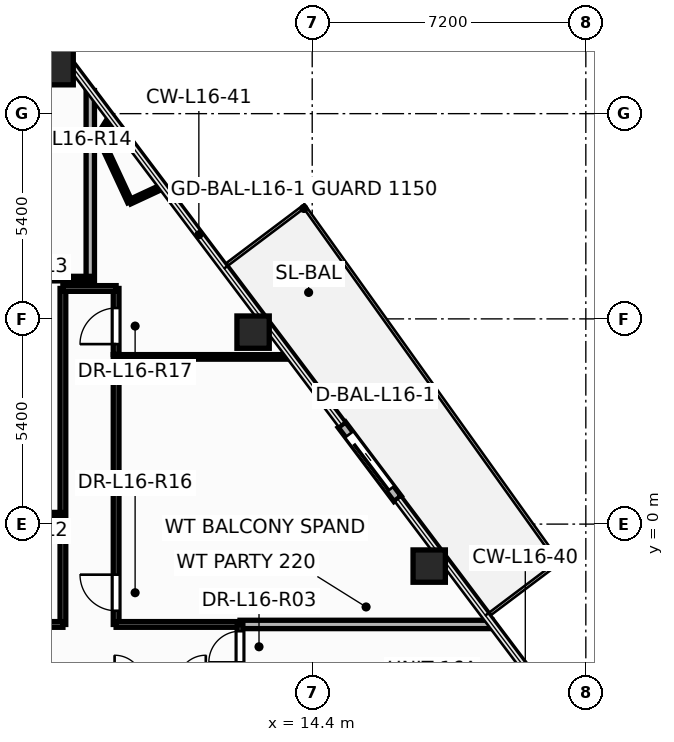
"""IFC4 building model, lengths in metres.
Left out: names, types, materials, properties, quantities, classifications, styles, units other than length and angle.
Written with IfcOpenShell. Run it as: python <this file> out.ifc"""

import sys

from ifc_helpers import new_model, si_unit, direction, frame, frame_2d, origin, origin_2d, place, context, subcontext, project, spatial, rectangle, hollow_rectangle, hollow_circle, extrude, element, fill, save


model = new_model("IFC4")
c1 = context("Model", 3, precision=1e-05, world=origin(), true_north=direction((0.0, 1.0)))
c2 = subcontext(c1, "Body", "Model", "MODEL_VIEW")
j1 = project(units=[si_unit("LENGTHUNIT", "METRE"), si_unit("PLANEANGLEUNIT", "RADIAN")], contexts=[c1])
p1 = place(None, origin())
s1 = spatial("IfcSite", under=j1, at=p1, CompositionType="ELEMENT")
p2 = place(p1, origin())
s2 = spatial("IfcBuilding", under=s1, at=p2, CompositionType="ELEMENT")
p3 = place(p2, frame((0.0, 0.0, 64.8)))
s3 = spatial("IfcBuildingStorey", under=s2, at=p3, CompositionType="ELEMENT", Elevation=64.8)
p4 = place(p3, frame((7.438, 12.233, 0.0), z_axis=(0.0, 0.0, 1.0), x_axis=(1.0, 0.0, 0.0)))
e1 = element("IfcColumn", 1, at=p4, inside=s3, PredefinedType="COLUMN", context=c2, shape_type="SweptSolid", body=[
    extrude(hollow_rectangle(XDim=1.35, YDim=1.35, WallThickness=0.065, at=origin_2d()), origin(), (0.0, 0.0, 1.0), 3.6),
])
for number, where, z_axis, x_axis in (
    (2, (17.479, -1.104, 0.0), (0.0, 0.0, 1.0), (1.0, 0.0, 0.0)),
    (3, (12.844, 5.051, 0.0), (0.0, 0.0, 1.0), (1.0, 0.0, 0.0)),
):
    element("IfcColumn", number, at=place(p3, frame(where, z_axis=z_axis, x_axis=x_axis)), inside=s3, PredefinedType="COLUMN", context=c2, shape_type="SweptSolid", body=[
        extrude(hollow_circle(Radius=0.425, WallThickness=0.038, at=origin_2d()), origin(), (0.0, 0.0, 1.0), 3.6),
    ])
p5 = place(p3, frame((16.646, 0.666, -0.015), z_axis=(0.0, 0.0, 1.0), x_axis=(-0.601471893772, 0.79889396105, 0.0)))
e4 = element("IfcWall", 4, at=p5, inside=s3, PredefinedType="STANDARD", context=c2, shape_type="SweptSolid", body=[
    extrude(rectangle(XDim=2.44, YDim=0.24, at=frame_2d((1.22, 0.0))), origin(), (0.0, 0.0, 1.0), 2.729),
])
p6 = place(p5, frame((0.32, 0.0, 0.015)))
e5 = element("IfcOpeningElement", 5, at=p6, cuts=e4, PredefinedType="OPENING", context=c2, shape_type="SweptSolid", body=[
    extrude(rectangle(XDim=1.806, YDim=2.204, at=frame_2d((0.9, 1.102))), frame((0.0, 0.13, 0.0), z_axis=(0.0, -1.0, 0.0), x_axis=(1.0, 0.0, 0.0)), (0.0, 0.0, 1.0), 0.26),
])
p7 = place(p3, frame((9.24, -2.64, 0.0), z_axis=(0.0, 0.0, 1.0), x_axis=(0.0, 1.0, 0.0)))
e6 = element("IfcWall", 6, at=p7, inside=s3, PredefinedType="PARTITIONING", context=c2, shape_type="SweptSolid", body=[
    extrude(rectangle(XDim=7.1, YDim=0.15, at=frame_2d((3.55, 0.0))), origin(), (0.0, 0.0, 1.0), 2.325),
])
p8 = place(p7, frame((0.36, 0.0, 0.0)))
e7 = element("IfcOpeningElement", 7, at=p8, cuts=e6, PredefinedType="OPENING", context=c2, shape_type="SweptSolid", body=[
    extrude(rectangle(XDim=0.956, YDim=2.104, at=frame_2d((0.475, 1.052))), frame((0.0, 0.085, 0.0), z_axis=(0.0, -1.0, 0.0), x_axis=(1.0, 0.0, 0.0)), (0.0, 0.0, 1.0), 0.17),
])
p9 = place(p3, frame((12.5, -2.64, 0.0), z_axis=(0.0, 0.0, 1.0), x_axis=(1.0, 0.0, 0.0)))
e8 = element("IfcWall", 8, at=p9, inside=s3, PredefinedType="PARTITIONING", context=c2, shape_type="SweptSolid", body=[
    extrude(rectangle(XDim=6.635, YDim=0.22, at=frame_2d((3.318, 0.0))), origin(), (0.0, 0.0, 1.0), 2.713),
])
p10 = place(p3, frame((7.84, -2.64, 0.0), z_axis=(0.0, 0.0, 1.0), x_axis=(0.0, 1.0, 0.0)))
e9 = element("IfcWall", 9, at=p10, inside=s3, PredefinedType="PARTITIONING", context=c2, shape_type="SweptSolid", body=[
    extrude(rectangle(XDim=8.84, YDim=0.15, at=frame_2d((4.42, 0.0))), origin(), (0.0, 0.0, 1.0), 2.325),
])
p11 = place(p3, frame((8.56, 6.2, 0.0), z_axis=(0.0, 0.0, 1.0), x_axis=(0.0, 1.0, 0.0)))
e10 = element("IfcWall", 10, at=p11, inside=s3, PredefinedType="PARTITIONING", context=c2, shape_type="SweptSolid", body=[
    extrude(rectangle(XDim=5.208, YDim=0.22, at=frame_2d((2.604, 0.0))), origin(), (0.0, 0.0, 1.0), 2.325),
])
p12 = place(p3, frame((9.24, 4.4, 0.0), z_axis=(0.0, 0.0, 1.0), x_axis=(1.0, 0.0, 0.0)))
e11 = element("IfcWall", 11, at=p12, inside=s3, PredefinedType="PARTITIONING", context=c2, shape_type="SweptSolid", body=[
    extrude(rectangle(XDim=4.595, YDim=0.12, at=frame_2d((2.298, 0.0))), origin(), (0.0, 0.0, 1.0), 2.713),
])
p13 = place(p3, frame((9.24, -2.64, 0.0), z_axis=(0.0, 0.0, 1.0), x_axis=(1.0, 0.0, 0.0)))
e12 = element("IfcWall", 12, at=p13, inside=s3, PredefinedType="PARTITIONING", context=c2, shape_type="SweptSolid", body=[
    extrude(rectangle(XDim=3.26, YDim=0.15, at=frame_2d((1.63, 0.0))), origin(), (0.0, 0.0, 1.0), 3.35),
])
p14 = place(p3, frame((5.96, 6.46, 0.0), z_axis=(0.0, 0.0, 1.0), x_axis=(1.0, 0.0, 0.0)))
e13 = element("IfcWall", 13, at=p14, inside=s3, PredefinedType="PARTITIONING", context=c2, shape_type="SweptSolid", body=[
    extrude(rectangle(XDim=2.6, YDim=0.12, at=frame_2d((1.3, 0.0))), origin(), (0.0, 0.0, 1.0), 3.35),
])
p15 = place(p3, frame((6.002, -2.64, 0.0), z_axis=(0.0, 0.0, 1.0), x_axis=(1.0, 0.0, 0.0)))
e14 = element("IfcWall", 14, at=p15, inside=s3, PredefinedType="PARTITIONING", context=c2, shape_type="SweptSolid", body=[
    extrude(rectangle(XDim=1.838, YDim=0.15, at=frame_2d((0.919, 0.0))), origin(), (0.0, 0.0, 1.0), 2.325),
])
p16 = place(p3, frame((9.6, 8.479, 0.0), z_axis=(0.0, 0.0, 1.0), x_axis=(-0.421813891412, 0.906682436695, 0.0)))
e15 = element("IfcWall", 15, at=p16, inside=s3, PredefinedType="PARTITIONING", context=c2, shape_type="SweptSolid", body=[
    extrude(rectangle(XDim=1.909, YDim=0.12, at=frame_2d((0.955, 0.0))), origin(), (0.0, 0.0, 1.0), 3.35),
])
p17 = place(p3, frame((5.96, 0.24, 0.0), z_axis=(0.0, 0.0, 1.0), x_axis=(1.0, 0.0, 0.0)))
e16 = element("IfcWall", 16, at=p17, inside=s3, PredefinedType="PARTITIONING", context=c2, shape_type="SweptSolid", body=[
    extrude(rectangle(XDim=1.88, YDim=0.135, at=frame_2d((0.94, 0.0))), origin(), (0.0, 0.0, 1.0), 2.325),
])
p18 = place(p3, frame((9.24, 4.462, 0.0), z_axis=(0.0, 0.0, 1.0), x_axis=(0.0, 1.0, 0.0)))
e17 = element("IfcWall", 17, at=p18, inside=s3, PredefinedType="PARTITIONING", context=c2, shape_type="SweptSolid", body=[
    extrude(rectangle(XDim=1.738, YDim=0.15, at=frame_2d((0.869, 0.0))), origin(), (0.0, 0.0, 1.0), 3.35),
])
p19 = place(p18, frame((0.274, 0.0, 0.0)))
e18 = element("IfcOpeningElement", 18, at=p19, cuts=e17, PredefinedType="OPENING", context=c2, shape_type="SweptSolid", body=[
    extrude(rectangle(XDim=0.956, YDim=2.104, at=frame_2d((0.475, 1.052))), frame((0.0, 0.085, 0.0), z_axis=(0.0, -1.0, 0.0), x_axis=(1.0, 0.0, 0.0)), (0.0, 0.0, 1.0), 0.17),
])
p20 = place(p3, frame((12.5, -4.24, 0.0), z_axis=(0.0, 0.0, 1.0), x_axis=(0.0, 1.0, 0.0)))
e19 = element("IfcWall", 19, at=p20, inside=s3, PredefinedType="PARTITIONING", context=c2, shape_type="SweptSolid", body=[
    extrude(rectangle(XDim=1.6, YDim=0.15, at=frame_2d((0.8, 0.0))), origin(), (0.0, 0.0, 1.0), 2.325),
])
p21 = place(p20, frame((0.602, 0.0, 0.0)))
e20 = element("IfcOpeningElement", 20, at=p21, cuts=e19, PredefinedType="OPENING", context=c2, shape_type="SweptSolid", body=[
    extrude(rectangle(XDim=0.826, YDim=2.104, at=frame_2d((0.41, 1.052))), frame((0.0, 0.085, 0.0), z_axis=(0.0, -1.0, 0.0), x_axis=(1.0, 0.0, 0.0)), (0.0, 0.0, 1.0), 0.17),
])
p22 = place(p3, frame((10.453, 8.876, 0.0), z_axis=(0.0, 0.0, 1.0), x_axis=(-0.906732650515, -0.421705940781, 0.0)))
e21 = element("IfcWall", 21, at=p22, inside=s3, PredefinedType="PARTITIONING", context=c2, shape_type="SweptSolid", body=[
    extrude(rectangle(XDim=0.941, YDim=0.12, at=frame_2d((0.47, 0.0))), origin(), (0.0, 0.0, 1.0), 2.713),
])
p23 = place(p3, frame((7.84, 6.2, 0.0), z_axis=(0.0, 0.0, 1.0), x_axis=(1.0, 0.0, 0.0)))
e22 = element("IfcWall", 22, at=p23, inside=s3, PredefinedType="PARTITIONING", context=c2, shape_type="SweptSolid", body=[
    extrude(rectangle(XDim=1.4, YDim=0.15, at=frame_2d((0.7, 0.0))), origin(), (0.0, 0.0, 1.0), 3.35),
])
p24 = place(p3, frame((8.795, 10.21, 0.0), z_axis=(0.0, 0.0, 1.0), x_axis=(0.528469521006, 0.848952275082, 0.0)))
e23 = element("IfcWall", 23, at=p24, inside=s3, PredefinedType="PARTITIONING", context=c2, shape_type="SweptSolid", body=[
    extrude(rectangle(XDim=0.56, YDim=0.12, at=frame_2d((0.28, 0.0))), origin(), (0.0, 0.0, 1.0), 2.713),
])
p25 = place(p6, origin())
e24 = element("IfcDoor", 24, at=p25, inside=s3, OperationType="SLIDING_TO_LEFT", PredefinedType="DOOR", context=c2, shape_type="SweptSolid", body=[
    extrude(rectangle(XDim=1.8, YDim=2.2, at=frame_2d((0.9, 1.1))), frame((0.0, 0.025, 0.0), z_axis=(0.0, -1.0, 0.0), x_axis=(1.0, 0.0, 0.0)), (0.0, 0.0, 1.0), 0.05),
])
fill(e5, e24)
p26 = place(p21, origin())
e25 = element("IfcDoor", 25, at=p26, inside=s3, OperationType="SINGLE_SWING_LEFT", PredefinedType="DOOR", context=c2, shape_type="SweptSolid", body=[
    extrude(rectangle(XDim=0.82, YDim=2.1, at=frame_2d((0.41, 1.05))), frame((0.0, 0.025, 0.0), z_axis=(0.0, -1.0, 0.0), x_axis=(1.0, 0.0, 0.0)), (0.0, 0.0, 1.0), 0.05),
])
fill(e20, e25)
p27 = place(p8, origin())
e26 = element("IfcDoor", 26, at=p27, inside=s3, OperationType="SINGLE_SWING_RIGHT", PredefinedType="DOOR", context=c2, shape_type="SweptSolid", body=[
    extrude(rectangle(XDim=0.95, YDim=2.1, at=frame_2d((0.475, 1.05))), frame((0.0, 0.025, 0.0), z_axis=(0.0, -1.0, 0.0), x_axis=(1.0, 0.0, 0.0)), (0.0, 0.0, 1.0), 0.05),
])
fill(e7, e26)
p28 = place(p19, origin())
e27 = element("IfcDoor", 27, at=p28, inside=s3, OperationType="SINGLE_SWING_LEFT", PredefinedType="DOOR", context=c2, shape_type="SweptSolid", body=[
    extrude(rectangle(XDim=0.95, YDim=2.1, at=frame_2d((0.475, 1.05))), frame((0.0, 0.025, 0.0), z_axis=(0.0, -1.0, 0.0), x_axis=(1.0, 0.0, 0.0)), (0.0, 0.0, 1.0), 0.05),
])
fill(e18, e27)
save(model, sys.argv[1])
